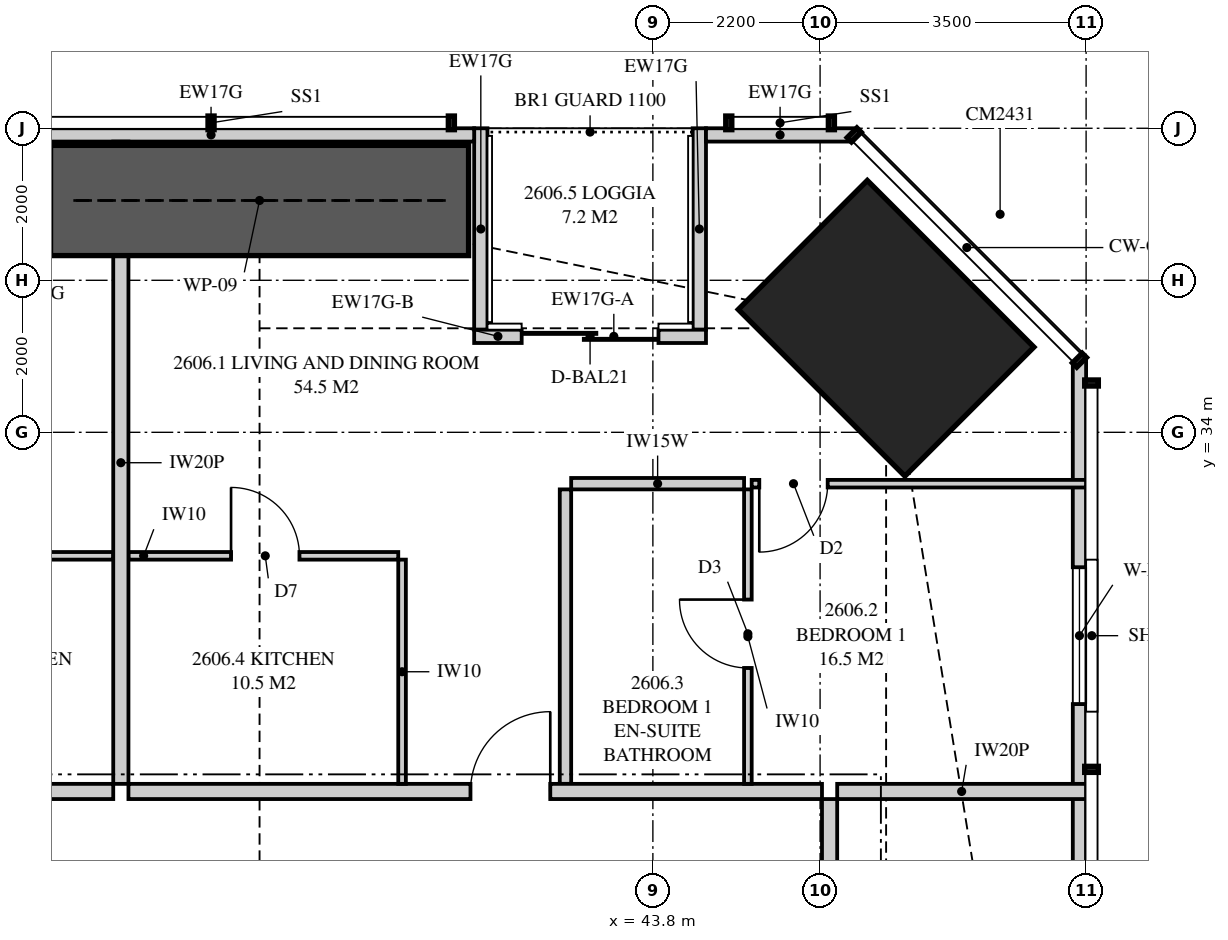
"""IFC4 building model, lengths in metres.
Left out: names, types, materials, properties, quantities, classifications, styles, units other than length and angle.
Written with IfcOpenShell. Run it as: python <this file> out.ifc"""

import sys

from ifc_helpers import new_model, si_unit, direction, frame, frame_2d, origin, origin_2d, place, context, subcontext, project, spatial, polyline, rectangle, outline, extrude, element, fill, save


model = new_model("IFC4")
c1 = context("Model", 3, precision=1e-05, world=origin(), true_north=direction((0.0, 1.0)))
c2 = subcontext(c1, "Body", "Model", "MODEL_VIEW")
j1 = project(units=[si_unit("LENGTHUNIT", "METRE"), si_unit("PLANEANGLEUNIT", "RADIAN")], contexts=[c1])
p1 = place(None, origin())
s1 = spatial("IfcSite", under=j1, at=p1, CompositionType="ELEMENT")
p2 = place(p1, origin())
s2 = spatial("IfcBuilding", under=s1, at=p2, CompositionType="ELEMENT")
p3 = place(p2, frame((0.0, 0.0, 98.15)))
s3 = spatial("IfcBuildingStorey", under=s2, at=p3, CompositionType="ELEMENT", Elevation=98.15)
p4 = place(p3, frame((46.869, 35.369, 0.0), z_axis=(0.0, 0.0, 1.0), x_axis=(-0.707106781187, -0.707106781187, 0.0)))
e1 = element("IfcColumn", 1, at=p4, inside=s3, PredefinedType="COLUMN", context=c2, shape_type="SweptSolid", body=[
    extrude(rectangle(XDim=2.4, YDim=3.1, at=origin_2d()), origin(), (0.0, 0.0, 1.0), 3.35),
])
p5 = place(p3, frame((49.413, 3.051, 0.0), z_axis=(0.0, 0.0, 1.0), x_axis=(0.0, 1.0, 0.0)))
e2 = element("IfcWall", 2, at=p5, inside=s3, PredefinedType="SOLIDWALL", context=c2, shape_type="SweptSolid", body=[
    extrude(outline(polyline([(0.0, 0.0), (31.897, 0.0), (31.897, 3.11), (22.167, 3.11), (22.167, 2.15), (22.074, 2.15), (22.074, 3.11), (21.949, 3.11), (21.949, 2.15), (9.949, 2.15), (9.949, 3.11), (9.823, 3.11), (9.823, 2.15), (9.73, 2.15), (9.73, 3.11), (0.0, 3.11), (0.0, 0.0)])), frame((0.0, 0.087, 0.0), z_axis=(0.0, -1.0, 0.0), x_axis=(1.0, 0.0, 0.0)), (0.0, 0.0, 1.0), 0.175),
])
p6 = place(p5, frame((2.224, 0.0, 0.4)))
e3 = element("IfcOpeningElement", 3, at=p6, cuts=e2, PredefinedType="OPENING", context=c2, shape_type="SweptSolid", body=[
    extrude(rectangle(XDim=1.8, YDim=1.7, at=frame_2d((0.9, 0.85))), frame((0.0, 0.097, 0.0), z_axis=(0.0, -1.0, 0.0), x_axis=(1.0, 0.0, 0.0)), (0.0, 0.0, 1.0), 0.195),
])
p7 = place(p5, frame((14.849, 0.0, 0.4)))
e4 = element("IfcOpeningElement", 4, at=p7, cuts=e2, PredefinedType="OPENING", context=c2, shape_type="SweptSolid", body=[
    extrude(rectangle(XDim=1.2, YDim=1.7, at=frame_2d((0.6, 0.85))), frame((0.0, 0.097, 0.0), z_axis=(0.0, -1.0, 0.0), x_axis=(1.0, 0.0, 0.0)), (0.0, 0.0, 1.0), 0.195),
])
p8 = place(p5, frame((27.373, 0.0, 0.4)))
e5 = element("IfcOpeningElement", 5, at=p8, cuts=e2, PredefinedType="OPENING", context=c2, shape_type="SweptSolid", body=[
    extrude(rectangle(XDim=1.8, YDim=1.7, at=frame_2d((0.9, 0.85))), frame((0.0, 0.097, 0.0), z_axis=(0.0, -1.0, 0.0), x_axis=(1.0, 0.0, 0.0)), (0.0, 0.0, 1.0), 0.195),
])
p9 = place(p3, frame((46.449, 37.913, 0.0), z_axis=(0.0, 0.0, 1.0), x_axis=(-1.0, 0.0, 0.0)))
e6 = element("IfcWall", 6, at=p9, inside=s3, PredefinedType="SOLIDWALL", context=c2, shape_type="SweptSolid", body=[
    extrude(rectangle(XDim=1.95, YDim=0.175, at=frame_2d((0.975, 0.0))), origin(), (0.0, 0.0, 1.0), 3.11),
])
p10 = place(p3, frame((41.449, 37.913, 0.0), z_axis=(0.0, 0.0, 1.0), x_axis=(-1.0, 0.0, 0.0)))
e7 = element("IfcWall", 7, at=p10, inside=s3, PredefinedType="SOLIDWALL", context=c2, shape_type="SweptSolid", body=[
    extrude(outline(polyline([(0.0, 0.0), (6.924, 0.0), (6.924, 2.15), (2.824, 2.15), (2.824, 3.11), (2.666, 3.11), (2.666, 2.15), (2.62, 2.15), (2.62, 3.11), (0.0, 3.11), (0.0, 0.0)])), frame((0.0, 0.087, 0.0), z_axis=(0.0, -1.0, 0.0), x_axis=(1.0, 0.0, 0.0)), (0.0, 0.0, 1.0), 0.175),
])
p11 = place(p3, frame((44.499, 35.262, 0.0), z_axis=(0.0, 0.0, 1.0), x_axis=(-1.0, 0.0, 0.0)))
e8 = element("IfcWall", 8, at=p11, inside=s3, PredefinedType="SOLIDWALL", context=c2, shape_type="SweptSolid", body=[
    extrude(rectangle(XDim=2.425, YDim=0.175, at=frame_2d((1.212, 0.0))), origin(), (0.0, 0.0, 1.0), 2.15),
])
p12 = place(p11, frame((0.625, 0.0, 0.0)))
e9 = element("IfcOpeningElement", 9, at=p12, cuts=e8, PredefinedType="OPENING", context=c2, shape_type="SweptSolid", body=[
    extrude(rectangle(XDim=1.8, YDim=2.1, at=frame_2d((0.9, 1.05))), frame((0.0, 0.097, 0.0), z_axis=(0.0, -1.0, 0.0), x_axis=(1.0, 0.0, 0.0)), (0.0, 0.0, 1.0), 0.195),
])
p13 = place(p3, frame((42.074, 35.262, 0.0), z_axis=(0.0, 0.0, 1.0), x_axis=(-1.0, 0.0, 0.0)))
e10 = element("IfcWall", 10, at=p13, inside=s3, PredefinedType="SOLIDWALL", context=c2, shape_type="SweptSolid", body=[
    extrude(rectangle(XDim=0.625, YDim=0.175, at=frame_2d((0.312, 0.0))), origin(), (0.0, 0.0, 1.0), 2.51),
])
p14 = place(p3, frame((44.411, 38.0, 0.0), z_axis=(0.0, 0.0, 1.0), x_axis=(0.0, -1.0, 0.0)))
e11 = element("IfcWall", 11, at=p14, inside=s3, PredefinedType="SOLIDWALL", context=c2, shape_type="SweptSolid", body=[
    extrude(outline(polyline([(0.0, 0.0), (2.65, 0.0), (2.65, 2.15), (1.296, 2.15), (1.296, 3.11), (0.0, 3.11), (0.0, 0.0)])), frame((0.0, 0.087, 0.0), z_axis=(0.0, -1.0, 0.0), x_axis=(1.0, 0.0, 0.0)), (0.0, 0.0, 1.0), 0.175),
])
p15 = place(p3, frame((41.536, 38.0, 0.0), z_axis=(0.0, 0.0, 1.0), x_axis=(0.0, -1.0, 0.0)))
e12 = element("IfcWall", 12, at=p15, inside=s3, PredefinedType="SOLIDWALL", context=c2, shape_type="SweptSolid", body=[
    extrude(outline(polyline([(0.0, 0.0), (2.65, 0.0), (2.65, 2.51), (2.378, 2.51), (2.378, 2.15), (0.709, 2.15), (0.709, 3.11), (0.0, 3.11), (0.0, 0.0)])), frame((0.0, 0.087, 0.0), z_axis=(0.0, -1.0, 0.0), x_axis=(1.0, 0.0, 0.0)), (0.0, 0.0, 1.0), 0.175),
])
p16 = place(p3, frame((36.8, 37.825, 0.0), z_axis=(0.0, 0.0, 1.0), x_axis=(0.0, -1.0, 0.0)))
e13 = element("IfcWall", 13, at=p16, inside=s3, PredefinedType="PARTITIONING", context=c2, shape_type="SweptSolid", body=[
    extrude(outline(polyline([(0.529, 2.15), (0.0, 2.15), (0.0, 0.0), (0.529, 0.0), (0.529, 0.257), (1.021, 0.257), (1.021, 0.0), (8.45, 0.0), (8.45, 3.11), (1.685, 3.11), (1.685, 2.15), (1.021, 2.15), (1.021, 1.894), (0.529, 1.894), (0.529, 2.15)])), frame((0.0, 0.1, 0.0), z_axis=(0.0, -1.0, 0.0), x_axis=(1.0, 0.0, 0.0)), (0.0, 0.0, 1.0), 0.2),
])
p17 = place(p3, frame((29.3, 29.275, 0.0), z_axis=(0.0, 0.0, 1.0), x_axis=(1.0, 0.0, 0.0)))
e14 = element("IfcWall", 14, at=p17, inside=s3, PredefinedType="PARTITIONING", context=c2, shape_type="SweptSolid", body=[
    extrude(rectangle(XDim=7.4, YDim=0.2, at=frame_2d((3.7, 0.0))), origin(), (0.0, 0.0, 1.0), 3.11),
])
p18 = place(p17, frame((3.2, 0.0, 0.0)))
e15 = element("IfcOpeningElement", 15, at=p18, cuts=e14, PredefinedType="OPENING", context=c2, shape_type="SweptSolid", body=[
    extrude(rectangle(XDim=1.05, YDim=2.2, at=frame_2d((0.525, 1.1))), frame((0.0, 0.11, 0.0), z_axis=(0.0, -1.0, 0.0), x_axis=(1.0, 0.0, 0.0)), (0.0, 0.0, 1.0), 0.22),
])
p19 = place(p3, frame((33.75, 32.375, 0.0), z_axis=(0.0, 0.0, 1.0), x_axis=(1.0, 0.0, 0.0)))
e16 = element("IfcWall", 16, at=p19, inside=s3, PredefinedType="PARTITIONING", context=c2, shape_type="SweptSolid", body=[
    extrude(rectangle(XDim=2.95, YDim=0.1, at=frame_2d((1.475, 0.0))), origin(), (0.0, 0.0, 1.0), 3.11),
])
p20 = place(p19, frame((1.0, 0.0, 0.0)))
e17 = element("IfcOpeningElement", 17, at=p20, cuts=e16, PredefinedType="OPENING", context=c2, shape_type="SweptSolid", body=[
    extrude(rectangle(XDim=0.9, YDim=2.1, at=frame_2d((0.45, 1.05))), frame((0.0, 0.06, 0.0), z_axis=(0.0, -1.0, 0.0), x_axis=(1.0, 0.0, 0.0)), (0.0, 0.0, 1.0), 0.12),
])
p21 = place(p3, frame((36.9, 29.275, 0.0), z_axis=(0.0, 0.0, 1.0), x_axis=(1.0, 0.0, 0.0)))
e18 = element("IfcWall", 18, at=p21, inside=s3, PredefinedType="PARTITIONING", context=c2, shape_type="SweptSolid", body=[
    extrude(outline(polyline([(0.0, 0.0), (9.125, 0.0), (9.125, 3.11), (2.062, 3.11), (2.062, 2.541), (1.388, 2.541), (1.388, 3.11), (0.0, 3.11), (0.0, 0.0)])), frame((0.0, 0.1, 0.0), z_axis=(0.0, -1.0, 0.0), x_axis=(1.0, 0.0, 0.0)), (0.0, 0.0, 1.0), 0.2),
])
p22 = place(p21, frame((4.5, 0.0, 0.0)))
e19 = element("IfcOpeningElement", 19, at=p22, cuts=e18, PredefinedType="OPENING", context=c2, shape_type="SweptSolid", body=[
    extrude(rectangle(XDim=1.05, YDim=2.2, at=frame_2d((0.525, 1.1))), frame((0.0, 0.11, 0.0), z_axis=(0.0, -1.0, 0.0), x_axis=(1.0, 0.0, 0.0)), (0.0, 0.0, 1.0), 0.22),
])
p23 = place(p3, frame((45.05, 33.249, 0.0), z_axis=(0.0, 0.0, 1.0), x_axis=(0.0, -1.0, 0.0)))
e20 = element("IfcWall", 20, at=p23, inside=s3, PredefinedType="PARTITIONING", context=c2, shape_type="SweptSolid", body=[
    extrude(rectangle(XDim=3.874, YDim=0.1, at=frame_2d((1.937, 0.0))), origin(), (0.0, 0.0, 1.0), 3.11),
])
p24 = place(p23, frame((1.45, 0.0, 0.0)))
e21 = element("IfcOpeningElement", 21, at=p24, cuts=e20, PredefinedType="OPENING", context=c2, shape_type="SweptSolid", body=[
    extrude(rectangle(XDim=0.9, YDim=2.1, at=frame_2d((0.45, 1.05))), frame((0.0, 0.06, 0.0), z_axis=(0.0, -1.0, 0.0), x_axis=(1.0, 0.0, 0.0)), (0.0, 0.0, 1.0), 0.12),
])
p25 = place(p3, frame((45.1, 33.324, 0.0), z_axis=(0.0, 0.0, 1.0), x_axis=(1.0, 0.0, 0.0)))
e22 = element("IfcWall", 22, at=p25, inside=s3, PredefinedType="PARTITIONING", context=c2, shape_type="SweptSolid", body=[
    extrude(outline(polyline([(0.0, 0.0), (4.4, 0.0), (4.4, 3.11), (2.971, 3.11), (2.971, 2.15), (1.229, 2.15), (1.229, 3.11), (0.0, 3.11), (0.0, 0.0)])), frame((0.0, 0.05, 0.0), z_axis=(0.0, -1.0, 0.0), x_axis=(1.0, 0.0, 0.0)), (0.0, 0.0, 1.0), 0.1),
])
p26 = place(p25, frame((0.1, 0.0, 0.0)))
e23 = element("IfcOpeningElement", 23, at=p26, cuts=e22, PredefinedType="OPENING", context=c2, shape_type="SweptSolid", body=[
    extrude(rectangle(XDim=0.9, YDim=2.1, at=frame_2d((0.45, 1.05))), frame((0.0, 0.06, 0.0), z_axis=(0.0, -1.0, 0.0), x_axis=(1.0, 0.0, 0.0)), (0.0, 0.0, 1.0), 0.12),
])
p27 = place(p3, frame((42.725, 33.324, 0.0), z_axis=(0.0, 0.0, 1.0), x_axis=(1.0, 0.0, 0.0)))
e24 = element("IfcWall", 24, at=p27, inside=s3, PredefinedType="PLUMBINGWALL", context=c2, shape_type="SweptSolid", body=[
    extrude(rectangle(XDim=2.275, YDim=0.15, at=frame_2d((1.137, 0.0))), origin(), (0.0, 0.0, 1.0), 3.11),
])
p28 = place(p3, frame((42.65, 33.249, 0.0), z_axis=(0.0, 0.0, 1.0), x_axis=(0.0, -1.0, 0.0)))
e25 = element("IfcWall", 25, at=p28, inside=s3, PredefinedType="PLUMBINGWALL", context=c2, shape_type="SweptSolid", body=[
    extrude(rectangle(XDim=3.874, YDim=0.15, at=frame_2d((1.937, 0.0))), origin(), (0.0, 0.0, 1.0), 3.11),
])
p29 = place(p3, frame((36.9, 32.375, 0.0), z_axis=(0.0, 0.0, 1.0), x_axis=(1.0, 0.0, 0.0)))
e26 = element("IfcWall", 26, at=p29, inside=s3, PredefinedType="PARTITIONING", context=c2, shape_type="SweptSolid", body=[
    extrude(outline(polyline([(0.0, 0.0), (3.55, 0.0), (3.55, 3.11), (2.012, 3.11), (2.012, 2.541), (1.438, 2.541), (1.438, 3.11), (0.0, 3.11), (0.0, 0.0)])), frame((0.0, 0.05, 0.0), z_axis=(0.0, -1.0, 0.0), x_axis=(1.0, 0.0, 0.0)), (0.0, 0.0, 1.0), 0.1),
])
p30 = place(p29, frame((1.35, 0.0, 0.0)))
e27 = element("IfcOpeningElement", 27, at=p30, cuts=e26, PredefinedType="OPENING", context=c2, shape_type="SweptSolid", body=[
    extrude(rectangle(XDim=0.9, YDim=2.1, at=frame_2d((0.45, 1.05))), frame((0.0, 0.06, 0.0), z_axis=(0.0, -1.0, 0.0), x_axis=(1.0, 0.0, 0.0)), (0.0, 0.0, 1.0), 0.12),
])
p31 = place(p3, frame((40.5, 32.325, 0.0), z_axis=(0.0, 0.0, 1.0), x_axis=(0.0, -1.0, 0.0)))
e28 = element("IfcWall", 28, at=p31, inside=s3, PredefinedType="PARTITIONING", context=c2, shape_type="SweptSolid", body=[
    extrude(rectangle(XDim=2.95, YDim=0.1, at=frame_2d((1.475, 0.0))), origin(), (0.0, 0.0, 1.0), 3.11),
])
p32 = place(p3, frame((46.225, 29.275, 0.0), z_axis=(0.0, 0.0, 1.0), x_axis=(1.0, 0.0, 0.0)))
e29 = element("IfcWall", 29, at=p32, inside=s3, PredefinedType="PARTITIONING", context=c2, shape_type="SweptSolid", body=[
    extrude(outline(polyline([(0.0, 0.0), (3.275, 0.0), (3.275, 3.11), (2.554, 3.11), (2.554, 2.15), (0.805, 2.15), (0.805, 2.541), (0.306, 2.541), (0.306, 3.11), (0.0, 3.11), (0.0, 0.0)])), frame((0.0, 0.1, 0.0), z_axis=(0.0, -1.0, 0.0), x_axis=(1.0, 0.0, 0.0)), (0.0, 0.0, 1.0), 0.2),
])
p33 = place(p3, frame((46.125, 20.7, 0.0), z_axis=(0.0, 0.0, 1.0), x_axis=(0.0, 1.0, 0.0)))
e30 = element("IfcWall", 30, at=p33, inside=s3, PredefinedType="PARTITIONING", context=c2, shape_type="SweptSolid", body=[
    extrude(outline(polyline([(0.0, 0.0), (8.475, 0.0), (8.475, 3.11), (4.637, 3.11), (4.637, 2.541), (3.963, 2.541), (3.963, 3.11), (0.0, 3.11), (0.0, 0.0)])), frame((0.0, 0.1, 0.0), z_axis=(0.0, -1.0, 0.0), x_axis=(1.0, 0.0, 0.0)), (0.0, 0.0, 1.0), 0.2),
])
p34 = place(p33, frame((6.625, 0.0, 0.0)))
e31 = element("IfcOpeningElement", 31, at=p34, cuts=e30, PredefinedType="OPENING", context=c2, shape_type="SweptSolid", body=[
    extrude(rectangle(XDim=1.0, YDim=2.1, at=frame_2d((0.5, 1.05))), frame((0.0, 0.11, 0.0), z_axis=(0.0, -1.0, 0.0), x_axis=(1.0, 0.0, 0.0)), (0.0, 0.0, 1.0), 0.22),
])
p35 = place(p3, frame((35.875, 37.05, 0.0), z_axis=(0.0, 0.0, 1.0), x_axis=(1.0, 0.0, 0.0)))
e32 = element("IfcWall", 32, at=p35, inside=s3, PredefinedType="SHEAR", context=c2, shape_type="SweptSolid", body=[
    extrude(rectangle(XDim=5.5, YDim=1.45, at=frame_2d((2.75, 0.0))), origin(), (0.0, 0.0, 1.0), 3.35),
])
p36 = place(p8, origin())
e33 = element("IfcWindow", 33, at=p36, inside=s3, PartitioningType="SINGLE_PANEL", PredefinedType="WINDOW", context=c2, shape_type="SweptSolid", body=[
    extrude(rectangle(XDim=1.8, YDim=1.7, at=frame_2d((0.9, 0.85))), frame((0.0, 0.03, 0.0), z_axis=(0.0, -1.0, 0.0), x_axis=(1.0, 0.0, 0.0)), (0.0, 0.0, 1.0), 0.06),
])
fill(e5, e33)
p37 = place(p12, origin())
e34 = element("IfcDoor", 34, at=p37, inside=s3, OperationType="SLIDING_TO_LEFT", PredefinedType="DOOR", context=c2, shape_type="SweptSolid", body=[
    extrude(rectangle(XDim=1.8, YDim=2.1, at=frame_2d((0.9, 1.05))), frame((0.0, 0.025, 0.0), z_axis=(0.0, -1.0, 0.0), x_axis=(1.0, 0.0, 0.0)), (0.0, 0.0, 1.0), 0.05),
])
fill(e9, e34)
p38 = place(p22, origin())
e35 = element("IfcDoor", 35, at=p38, inside=s3, OperationType="SINGLE_SWING_RIGHT", PredefinedType="DOOR", context=c2, shape_type="SweptSolid", body=[
    extrude(rectangle(XDim=1.05, YDim=2.2, at=frame_2d((0.525, 1.1))), frame((0.0, 0.025, 0.0), z_axis=(0.0, -1.0, 0.0), x_axis=(1.0, 0.0, 0.0)), (0.0, 0.0, 1.0), 0.05),
])
fill(e19, e35)
p39 = place(p26, frame((0.9, 0.0, 0.0), z_axis=(0.0, 0.0, 1.0), x_axis=(-1.0, 0.0, 0.0)))
e36 = element("IfcDoor", 36, at=p39, inside=s3, OperationType="SINGLE_SWING_RIGHT", PredefinedType="DOOR", context=c2, shape_type="SweptSolid", body=[
    extrude(rectangle(XDim=0.9, YDim=2.1, at=frame_2d((0.45, 1.05))), frame((0.0, 0.025, 0.0), z_axis=(0.0, -1.0, 0.0), x_axis=(1.0, 0.0, 0.0)), (0.0, 0.0, 1.0), 0.05),
])
fill(e23, e36)
p40 = place(p24, frame((0.9, 0.0, 0.0), z_axis=(0.0, 0.0, 1.0), x_axis=(-1.0, 0.0, 0.0)))
e37 = element("IfcDoor", 37, at=p40, inside=s3, OperationType="SINGLE_SWING_RIGHT", PredefinedType="DOOR", context=c2, shape_type="SweptSolid", body=[
    extrude(rectangle(XDim=0.9, YDim=2.1, at=frame_2d((0.45, 1.05))), frame((0.0, 0.025, 0.0), z_axis=(0.0, -1.0, 0.0), x_axis=(1.0, 0.0, 0.0)), (0.0, 0.0, 1.0), 0.05),
])
fill(e21, e37)
p41 = place(p30, origin())
e38 = element("IfcDoor", 38, at=p41, inside=s3, OperationType="SINGLE_SWING_LEFT", PredefinedType="DOOR", context=c2, shape_type="SweptSolid", body=[
    extrude(rectangle(XDim=0.9, YDim=2.1, at=frame_2d((0.45, 1.05))), frame((0.0, 0.025, 0.0), z_axis=(0.0, -1.0, 0.0), x_axis=(1.0, 0.0, 0.0)), (0.0, 0.0, 1.0), 0.05),
])
fill(e27, e38)
save(model, sys.argv[1])
